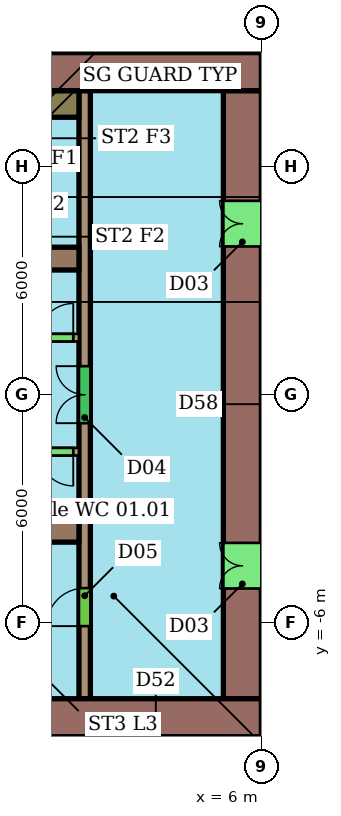
"""IFC4 building model, lengths in metres.
Left out: names, types, materials, properties, quantities, classifications, styles, units other than length and angle.
Written with IfcOpenShell. Run it as: python <this file> out.ifc"""

import sys

from ifc_helpers import new_model, si_unit, direction, frame, frame_2d, origin, place, context, subcontext, project, spatial, rectangle, extrude, element, fill, save


model = new_model("IFC4")
c1 = context("Model", 3, precision=1e-05, world=origin(), true_north=direction((0.0, 1.0)))
c2 = subcontext(c1, "Body", "Model", "MODEL_VIEW")
j1 = project(units=[si_unit("LENGTHUNIT", "METRE"), si_unit("PLANEANGLEUNIT", "RADIAN")], contexts=[c1])
p1 = place(None, origin())
s1 = spatial("IfcSite", under=j1, at=p1, CompositionType="ELEMENT")
p2 = place(p1, origin())
s2 = spatial("IfcBuilding", under=s1, at=p2, CompositionType="ELEMENT")
p3 = place(p2, frame((0.0, 0.0, 8.0)))
s3 = spatial("IfcBuildingStorey", under=s2, at=p3, CompositionType="ELEMENT", Elevation=8.0)
p4 = place(p3, frame((6.0, 8.5, 0.0), z_axis=(0.0, 0.0, 1.0), x_axis=(-1.0, 0.0, 0.0)))
e1 = element("IfcWall", 1, at=p4, inside=s3, PredefinedType="SHEAR", context=c2, shape_type="SweptSolid", body=[
    extrude(rectangle(XDim=12.0, YDim=1.0, at=frame_2d((6.0, 0.0))), origin(), (0.0, 0.0, 1.0), 8.7),
])
p5 = place(p4, frame((5.6, 0.0, 0.0)))
e2 = element("IfcOpeningElement", 2, at=p5, cuts=e1, PredefinedType="OPENING", context=c2, shape_type="SweptSolid", body=[
    extrude(rectangle(XDim=1.2, YDim=2.1, at=frame_2d((0.6, 1.05))), frame((0.0, 0.51, 0.0), z_axis=(0.0, -1.0, 0.0), x_axis=(1.0, 0.0, 0.0)), (0.0, 0.0, 1.0), 1.02),
])
p6 = place(p3, frame((-18.0, -8.5, 0.0), z_axis=(0.0, 0.0, 1.0), x_axis=(1.0, 0.0, 0.0)))
e3 = element("IfcWall", 3, at=p6, inside=s3, PredefinedType="SHEAR", context=c2, shape_type="SweptSolid", body=[
    extrude(rectangle(XDim=24.0, YDim=1.0, at=frame_2d((12.0, 0.0))), origin(), (0.0, 0.0, 1.0), 8.7),
])
p7 = place(p6, frame((6.0, 0.0, 0.0)))
e4 = element("IfcOpeningElement", 4, at=p7, cuts=e3, PredefinedType="OPENING", context=c2, shape_type="SweptSolid", body=[
    extrude(rectangle(XDim=1.2, YDim=2.1, at=frame_2d((0.6, 1.05))), frame((0.0, 0.51, 0.0), z_axis=(0.0, -1.0, 0.0), x_axis=(1.0, 0.0, 0.0)), (0.0, 0.0, 1.0), 1.02),
])
p8 = place(p3, frame((5.5, -8.0, 0.0), z_axis=(0.0, 0.0, 1.0), x_axis=(0.0, 1.0, 0.0)))
e5 = element("IfcWall", 5, at=p8, inside=s3, PredefinedType="SHEAR", context=c2, shape_type="SweptSolid", body=[
    extrude(rectangle(XDim=16.0, YDim=1.0, at=frame_2d((8.0, 0.0))), origin(), (0.0, 0.0, 1.0), 8.7),
])
p9 = place(p8, frame((2.9, 0.0, 0.0)))
e6 = element("IfcOpeningElement", 6, at=p9, cuts=e5, PredefinedType="OPENING", context=c2, shape_type="SweptSolid", body=[
    extrude(rectangle(XDim=1.2, YDim=2.1, at=frame_2d((0.6, 1.05))), frame((0.0, 0.51, 0.0), z_axis=(0.0, -1.0, 0.0), x_axis=(1.0, 0.0, 0.0)), (0.0, 0.0, 1.0), 1.02),
])
p10 = place(p8, frame((11.9, 0.0, 0.0)))
e7 = element("IfcOpeningElement", 7, at=p10, cuts=e5, PredefinedType="OPENING", context=c2, shape_type="SweptSolid", body=[
    extrude(rectangle(XDim=1.2, YDim=2.1, at=frame_2d((0.6, 1.05))), frame((0.0, 0.51, 0.0), z_axis=(0.0, -1.0, 0.0), x_axis=(1.0, 0.0, 0.0)), (0.0, 0.0, 1.0), 1.02),
])
for number, where, z_axis, x_axis in (
    (8, (-6.0, 3.58, 0.0), (0.0, 0.0, 1.0), (1.0, 0.0, 0.0)),
    (9, (-6.0, -3.58, 0.0), (0.0, 0.0, 1.0), (1.0, 0.0, 0.0)),
):
    element("IfcWall", number, at=place(p3, frame(where, z_axis=z_axis, x_axis=x_axis)), inside=s3, PredefinedType="SHEAR", context=c2, shape_type="SweptSolid", body=[
        extrude(rectangle(XDim=7.2, YDim=0.6, at=frame_2d((3.6, 0.0))), origin(), (0.0, 0.0, 1.0), 8.7),
    ])
p11 = place(p3, frame((1.35, -8.0, 0.0), z_axis=(0.0, 0.0, 1.0), x_axis=(0.0, 1.0, 0.0)))
e10 = element("IfcWall", 10, at=p11, inside=s3, PredefinedType="SHEAR", context=c2, shape_type="SweptSolid", body=[
    extrude(rectangle(XDim=16.0, YDim=0.3, at=frame_2d((8.0, 0.0))), origin(), (0.0, 0.0, 1.0), 8.7),
])
p12 = place(p11, frame((1.91, 0.0, 0.0)))
e11 = element("IfcOpeningElement", 11, at=p12, cuts=e10, PredefinedType="OPENING", context=c2, shape_type="SweptSolid", body=[
    extrude(rectangle(XDim=1.0, YDim=2.1, at=frame_2d((0.5, 1.05))), frame((0.0, 0.16, 0.0), z_axis=(0.0, -1.0, 0.0), x_axis=(1.0, 0.0, 0.0)), (0.0, 0.0, 1.0), 0.32),
])
p13 = place(p11, frame((7.25, 0.0, 0.0)))
e12 = element("IfcOpeningElement", 12, at=p13, cuts=e10, PredefinedType="OPENING", context=c2, shape_type="SweptSolid", body=[
    extrude(rectangle(XDim=1.5, YDim=2.1, at=frame_2d((0.75, 1.05))), frame((0.0, 0.16, 0.0), z_axis=(0.0, -1.0, 0.0), x_axis=(1.0, 0.0, 0.0)), (0.0, 0.0, 1.0), 0.32),
])
p14 = place(p3, frame((-13.2, 1.5, 0.0), z_axis=(0.0, 0.0, 1.0), x_axis=(1.0, 0.0, 0.0)))
e13 = element("IfcWall", 13, at=p14, inside=s3, PredefinedType="SHEAR", context=c2, shape_type="SweptSolid", body=[
    extrude(rectangle(XDim=14.4, YDim=0.2, at=frame_2d((7.2, 0.0))), origin(), (0.0, 0.0, 1.0), 8.7),
])
p15 = place(p14, frame((0.546, 0.0, 0.0)))
e14 = element("IfcOpeningElement", 14, at=p15, cuts=e13, PredefinedType="OPENING", context=c2, shape_type="SweptSolid", body=[
    extrude(rectangle(XDim=1.1, YDim=2.1, at=frame_2d((0.55, 1.05))), frame((0.0, 0.11, 0.0), z_axis=(0.0, -1.0, 0.0), x_axis=(1.0, 0.0, 0.0)), (0.0, 0.0, 1.0), 0.22),
])
p16 = place(p14, frame((2.988, 0.0, 0.0)))
e15 = element("IfcOpeningElement", 15, at=p16, cuts=e13, PredefinedType="OPENING", context=c2, shape_type="SweptSolid", body=[
    extrude(rectangle(XDim=1.1, YDim=2.1, at=frame_2d((0.55, 1.05))), frame((0.0, 0.11, 0.0), z_axis=(0.0, -1.0, 0.0), x_axis=(1.0, 0.0, 0.0)), (0.0, 0.0, 1.0), 0.22),
])
p17 = place(p14, frame((5.429, 0.0, 0.0)))
e16 = element("IfcOpeningElement", 16, at=p17, cuts=e13, PredefinedType="OPENING", context=c2, shape_type="SweptSolid", body=[
    extrude(rectangle(XDim=1.1, YDim=2.1, at=frame_2d((0.55, 1.05))), frame((0.0, 0.11, 0.0), z_axis=(0.0, -1.0, 0.0), x_axis=(1.0, 0.0, 0.0)), (0.0, 0.0, 1.0), 0.22),
])
p18 = place(p14, frame((7.871, 0.0, 0.0)))
e17 = element("IfcOpeningElement", 17, at=p18, cuts=e13, PredefinedType="OPENING", context=c2, shape_type="SweptSolid", body=[
    extrude(rectangle(XDim=1.1, YDim=2.1, at=frame_2d((0.55, 1.05))), frame((0.0, 0.11, 0.0), z_axis=(0.0, -1.0, 0.0), x_axis=(1.0, 0.0, 0.0)), (0.0, 0.0, 1.0), 0.22),
])
p19 = place(p14, frame((13.35, 0.0, 0.0)))
e18 = element("IfcOpeningElement", 18, at=p19, cuts=e13, PredefinedType="OPENING", context=c2, shape_type="SweptSolid", body=[
    extrude(rectangle(XDim=0.9, YDim=2.1, at=frame_2d((0.45, 1.05))), frame((0.0, 0.11, 0.0), z_axis=(0.0, -1.0, 0.0), x_axis=(1.0, 0.0, 0.0)), (0.0, 0.0, 1.0), 0.22),
])
p20 = place(p3, frame((1.2, -1.5, 0.0), z_axis=(0.0, 0.0, 1.0), x_axis=(-1.0, 0.0, 0.0)))
e19 = element("IfcWall", 19, at=p20, inside=s3, PredefinedType="SHEAR", context=c2, shape_type="SweptSolid", body=[
    extrude(rectangle(XDim=14.4, YDim=0.2, at=frame_2d((7.2, 0.0))), origin(), (0.0, 0.0, 1.0), 8.7),
])
p21 = place(p20, frame((7.821, 0.0, 0.0)))
e20 = element("IfcOpeningElement", 20, at=p21, cuts=e19, PredefinedType="OPENING", context=c2, shape_type="SweptSolid", body=[
    extrude(rectangle(XDim=1.2, YDim=2.1, at=frame_2d((0.6, 1.05))), frame((0.0, 0.11, 0.0), z_axis=(0.0, -1.0, 0.0), x_axis=(1.0, 0.0, 0.0)), (0.0, 0.0, 1.0), 0.22),
])
p22 = place(p20, frame((0.15, 0.0, 0.0)))
e21 = element("IfcOpeningElement", 21, at=p22, cuts=e19, PredefinedType="OPENING", context=c2, shape_type="SweptSolid", body=[
    extrude(rectangle(XDim=0.9, YDim=2.1, at=frame_2d((0.45, 1.05))), frame((0.0, 0.11, 0.0), z_axis=(0.0, -1.0, 0.0), x_axis=(1.0, 0.0, 0.0)), (0.0, 0.0, 1.0), 0.22),
])
p23 = place(p3, frame((0.4, 7.65, 0.0), z_axis=(0.0, 0.0, 1.0), x_axis=(1.0, 0.0, 0.0)))
e22 = element("IfcWall", 22, at=p23, inside=s3, PredefinedType="SHEAR", context=c2, shape_type="SweptSolid", body=[
    extrude(rectangle(XDim=0.8, YDim=0.7, at=frame_2d((0.4, 0.0))), origin(), (0.0, 0.0, 1.0), 8.7),
])
p24 = place(p9, origin())
e23 = element("IfcDoor", 23, at=p24, inside=s3, OperationType="DOUBLE_DOOR_SINGLE_SWING", PredefinedType="NOTDEFINED", context=c2, shape_type="SweptSolid", body=[
    extrude(rectangle(XDim=1.2, YDim=2.1, at=frame_2d((0.6, 1.05))), frame((0.0, 0.025, 0.0), z_axis=(0.0, -1.0, 0.0), x_axis=(1.0, 0.0, 0.0)), (0.0, 0.0, 1.0), 0.05),
])
fill(e6, e23)
p25 = place(p10, origin())
e24 = element("IfcDoor", 24, at=p25, inside=s3, OperationType="DOUBLE_DOOR_SINGLE_SWING", PredefinedType="NOTDEFINED", context=c2, shape_type="SweptSolid", body=[
    extrude(rectangle(XDim=1.2, YDim=2.1, at=frame_2d((0.6, 1.05))), frame((0.0, 0.025, 0.0), z_axis=(0.0, -1.0, 0.0), x_axis=(1.0, 0.0, 0.0)), (0.0, 0.0, 1.0), 0.05),
])
fill(e7, e24)
p26 = place(p12, origin())
e25 = element("IfcDoor", 25, at=p26, inside=s3, OperationType="SINGLE_SWING_LEFT", PredefinedType="NOTDEFINED", context=c2, shape_type="SweptSolid", body=[
    extrude(rectangle(XDim=1.0, YDim=2.1, at=frame_2d((0.5, 1.05))), frame((0.0, 0.025, 0.0), z_axis=(0.0, -1.0, 0.0), x_axis=(1.0, 0.0, 0.0)), (0.0, 0.0, 1.0), 0.05),
])
fill(e11, e25)
p27 = place(p13, origin())
e26 = element("IfcDoor", 26, at=p27, inside=s3, OperationType="DOUBLE_DOOR_SINGLE_SWING", PredefinedType="NOTDEFINED", context=c2, shape_type="SweptSolid", body=[
    extrude(rectangle(XDim=1.5, YDim=2.1, at=frame_2d((0.75, 1.05))), frame((0.0, 0.025, 0.0), z_axis=(0.0, -1.0, 0.0), x_axis=(1.0, 0.0, 0.0)), (0.0, 0.0, 1.0), 0.05),
])
fill(e12, e26)
p28 = place(p19, origin())
e27 = element("IfcDoor", 27, at=p28, inside=s3, OperationType="SINGLE_SWING_RIGHT", PredefinedType="NOTDEFINED", context=c2, shape_type="SweptSolid", body=[
    extrude(rectangle(XDim=0.9, YDim=2.1, at=frame_2d((0.45, 1.05))), frame((0.0, 0.025, 0.0), z_axis=(0.0, -1.0, 0.0), x_axis=(1.0, 0.0, 0.0)), (0.0, 0.0, 1.0), 0.05),
])
fill(e18, e27)
p29 = place(p22, origin())
e28 = element("IfcDoor", 28, at=p29, inside=s3, OperationType="SINGLE_SWING_LEFT", PredefinedType="NOTDEFINED", context=c2, shape_type="SweptSolid", body=[
    extrude(rectangle(XDim=0.9, YDim=2.1, at=frame_2d((0.45, 1.05))), frame((0.0, 0.025, 0.0), z_axis=(0.0, -1.0, 0.0), x_axis=(1.0, 0.0, 0.0)), (0.0, 0.0, 1.0), 0.05),
])
fill(e21, e28)
save(model, sys.argv[1])
